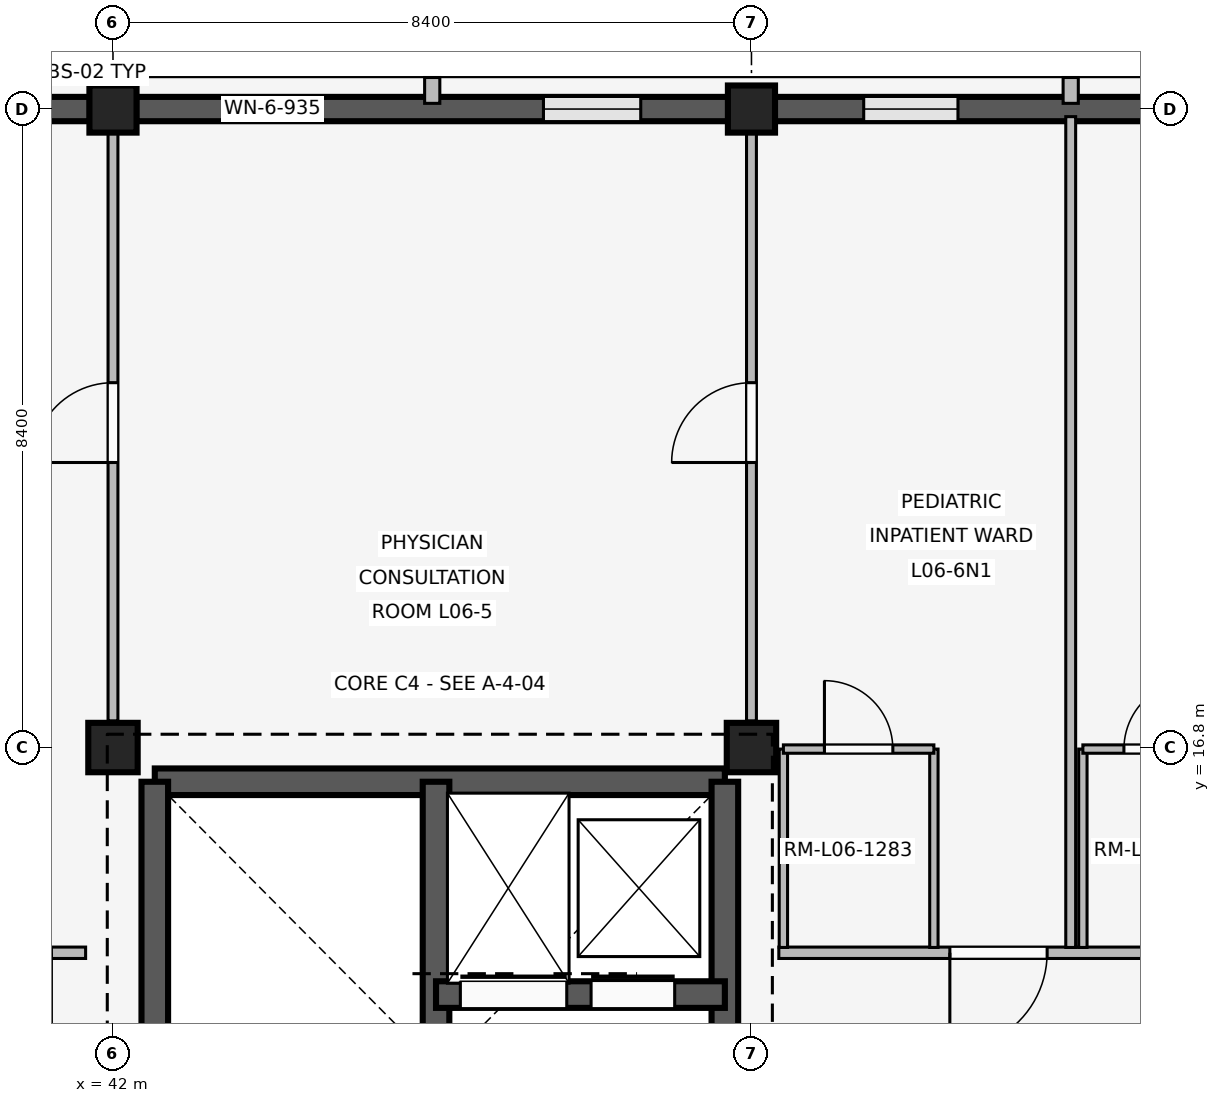
"""IFC4 building model, lengths in metres.
Left out: names, types, materials, properties, quantities, classifications, styles, units other than length and angle.
Written with IfcOpenShell. Run it as: python <this file> out.ifc"""

import sys

from ifc_helpers import new_model, si_unit, direction, frame, frame_2d, origin, origin_2d, place, context, subcontext, project, spatial, rectangle, extrude, element, fill, save


model = new_model("IFC4")
c1 = context("Model", 3, precision=1e-05, world=origin(), true_north=direction((0.0, 1.0)))
c2 = subcontext(c1, "Body", "Model", "MODEL_VIEW")
j1 = project(units=[si_unit("LENGTHUNIT", "METRE"), si_unit("PLANEANGLEUNIT", "RADIAN")], contexts=[c1])
p1 = place(None, origin())
s1 = spatial("IfcSite", under=j1, at=p1, CompositionType="ELEMENT")
p2 = place(p1, origin())
s2 = spatial("IfcBuilding", under=s1, at=p2, CompositionType="ELEMENT")
p3 = place(p2, frame((0.0, 0.0, 24.6)))
s3 = spatial("IfcBuildingStorey", under=s2, at=p3, CompositionType="ELEMENT", Elevation=24.6)
p4 = place(p3, frame((42.0, 16.8, 0.0), z_axis=(0.0, 0.0, 1.0), x_axis=(1.0, 0.0, 0.0)))
e1 = element("IfcColumn", 1, at=p4, inside=s3, PredefinedType="COLUMN", context=c2, shape_type="SweptSolid", body=[
    extrude(rectangle(XDim=0.65, YDim=0.65, at=origin_2d()), origin(), (0.0, 0.0, 1.0), 4.2),
])
p5 = place(p3, frame((42.0, 25.2, 0.0), z_axis=(0.0, 0.0, 1.0), x_axis=(1.0, 0.0, 0.0)))
e2 = element("IfcColumn", 2, at=p5, inside=s3, PredefinedType="COLUMN", context=c2, shape_type="SweptSolid", body=[
    extrude(rectangle(XDim=0.62, YDim=0.62, at=origin_2d()), origin(), (0.0, 0.0, 1.0), 4.2),
])
p6 = place(p3, frame((50.4, 16.8, 0.0), z_axis=(0.0, 0.0, 1.0), x_axis=(1.0, 0.0, 0.0)))
e3 = element("IfcColumn", 3, at=p6, inside=s3, PredefinedType="COLUMN", context=c2, shape_type="SweptSolid", body=[
    extrude(rectangle(XDim=0.65, YDim=0.65, at=origin_2d()), origin(), (0.0, 0.0, 1.0), 4.2),
])
p7 = place(p3, frame((50.4, 25.2, 0.0), z_axis=(0.0, 0.0, 1.0), x_axis=(1.0, 0.0, 0.0)))
e4 = element("IfcColumn", 4, at=p7, inside=s3, PredefinedType="COLUMN", context=c2, shape_type="SweptSolid", body=[
    extrude(rectangle(XDim=0.62, YDim=0.62, at=origin_2d()), origin(), (0.0, 0.0, 1.0), 4.2),
])
p8 = place(p3, frame((33.905, 25.2, 0.0), z_axis=(0.0, 0.0, 1.0), x_axis=(1.0, 0.0, 0.0)))
e5 = element("IfcWall", 5, at=p8, inside=s3, PredefinedType="SOLIDWALL", context=c2, shape_type="SweptSolid", body=[
    extrude(rectangle(XDim=7.79, YDim=0.32, at=frame_2d((3.895, 0.0))), origin(), (0.0, 0.0, 1.0), 3.34),
])
p9 = place(p8, frame((1.112, 0.0, 0.85)))
e6 = element("IfcOpeningElement", 6, at=p9, cuts=e5, PredefinedType="OPENING", context=c2, shape_type="SweptSolid", body=[
    extrude(rectangle(XDim=1.36, YDim=1.42, at=frame_2d((0.68, 0.71))), frame((0.0, 0.17, 0.0), z_axis=(0.0, -1.0, 0.0), x_axis=(1.0, 0.0, 0.0)), (0.0, 0.0, 1.0), 0.34),
])
p10 = place(p8, frame((5.318, 0.0, 0.85)))
e7 = element("IfcOpeningElement", 7, at=p10, cuts=e5, PredefinedType="OPENING", context=c2, shape_type="SweptSolid", body=[
    extrude(rectangle(XDim=1.36, YDim=1.42, at=frame_2d((0.68, 0.71))), frame((0.0, 0.17, 0.0), z_axis=(0.0, -1.0, 0.0), x_axis=(1.0, 0.0, 0.0)), (0.0, 0.0, 1.0), 0.34),
])
p11 = place(p3, frame((42.305, 25.2, 0.0), z_axis=(0.0, 0.0, 1.0), x_axis=(1.0, 0.0, 0.0)))
e8 = element("IfcWall", 8, at=p11, inside=s3, PredefinedType="SOLIDWALL", context=c2, shape_type="SweptSolid", body=[
    extrude(rectangle(XDim=7.79, YDim=0.32, at=frame_2d((3.895, 0.0))), origin(), (0.0, 0.0, 1.0), 3.34),
])
p12 = place(p11, frame((1.152, 0.0, 0.85)))
e9 = element("IfcOpeningElement", 9, at=p12, cuts=e8, PredefinedType="OPENING", context=c2, shape_type="SweptSolid", body=[
    extrude(rectangle(XDim=1.28, YDim=1.38, at=frame_2d((0.64, 0.69))), frame((0.0, 0.17, 0.0), z_axis=(0.0, -1.0, 0.0), x_axis=(1.0, 0.0, 0.0)), (0.0, 0.0, 1.0), 0.34),
])
p13 = place(p11, frame((5.358, 0.0, 0.85)))
e10 = element("IfcOpeningElement", 10, at=p13, cuts=e8, PredefinedType="OPENING", context=c2, shape_type="SweptSolid", body=[
    extrude(rectangle(XDim=1.28, YDim=1.38, at=frame_2d((0.64, 0.69))), frame((0.0, 0.17, 0.0), z_axis=(0.0, -1.0, 0.0), x_axis=(1.0, 0.0, 0.0)), (0.0, 0.0, 1.0), 0.34),
])
p14 = place(p3, frame((46.2, 25.275, 0.0), z_axis=(0.0, 0.0, 1.0), x_axis=(0.0, 1.0, 0.0)))
e11 = element("IfcWall", 11, at=p14, inside=s3, PredefinedType="ELEMENTEDWALL", context=c2, shape_type="SweptSolid", body=[
    extrude(rectangle(XDim=0.34, YDim=0.2, at=frame_2d((0.17, 0.0))), origin(), (0.0, 0.0, 1.0), 3.32),
])
p15 = place(p3, frame((50.705, 25.2, 0.0), z_axis=(0.0, 0.0, 1.0), x_axis=(1.0, 0.0, 0.0)))
e12 = element("IfcWall", 12, at=p15, inside=s3, PredefinedType="SOLIDWALL", context=c2, shape_type="SweptSolid", body=[
    extrude(rectangle(XDim=7.79, YDim=0.32, at=frame_2d((3.895, 0.0))), origin(), (0.0, 0.0, 1.0), 3.34),
])
p16 = place(p15, frame((1.172, 0.0, 0.85)))
e13 = element("IfcOpeningElement", 13, at=p16, cuts=e12, PredefinedType="OPENING", context=c2, shape_type="SweptSolid", body=[
    extrude(rectangle(XDim=1.24, YDim=1.34, at=frame_2d((0.62, 0.67))), frame((0.0, 0.17, 0.0), z_axis=(0.0, -1.0, 0.0), x_axis=(1.0, 0.0, 0.0)), (0.0, 0.0, 1.0), 0.34),
])
p17 = place(p15, frame((5.378, 0.0, 0.85)))
e14 = element("IfcOpeningElement", 14, at=p17, cuts=e12, PredefinedType="OPENING", context=c2, shape_type="SweptSolid", body=[
    extrude(rectangle(XDim=1.24, YDim=1.34, at=frame_2d((0.62, 0.67))), frame((0.0, 0.17, 0.0), z_axis=(0.0, -1.0, 0.0), x_axis=(1.0, 0.0, 0.0)), (0.0, 0.0, 1.0), 0.34),
])
p18 = place(p3, frame((54.6, 25.275, 0.0), z_axis=(0.0, 0.0, 1.0), x_axis=(0.0, 1.0, 0.0)))
e15 = element("IfcWall", 15, at=p18, inside=s3, PredefinedType="ELEMENTEDWALL", context=c2, shape_type="SweptSolid", body=[
    extrude(rectangle(XDim=0.34, YDim=0.2, at=frame_2d((0.17, 0.0))), origin(), (0.0, 0.0, 1.0), 3.32),
])
p19 = place(p3, frame((42.55, 16.35, 0.0), z_axis=(0.0, 0.0, 1.0), x_axis=(1.0, 0.0, 0.0)))
e16 = element("IfcWall", 16, at=p19, inside=s3, PredefinedType="SHEAR", context=c2, shape_type="SweptSolid", body=[
    extrude(rectangle(XDim=7.5, YDim=0.35, at=frame_2d((3.75, 0.0))), origin(), (0.0, 0.0, 1.0), 3.92),
])
p20 = place(p3, frame((42.55, 8.8, 0.0), z_axis=(0.0, 0.0, 1.0), x_axis=(0.0, 1.0, 0.0)))
e17 = element("IfcWall", 17, at=p20, inside=s3, PredefinedType="SHEAR", context=c2, shape_type="SweptSolid", body=[
    extrude(rectangle(XDim=7.55, YDim=0.35, at=frame_2d((3.775, 0.0))), origin(), (0.0, 0.0, 1.0), 3.92),
])
p21 = place(p20, frame((0.28, 0.0, 0.0)))
e18 = element("IfcOpeningElement", 18, at=p21, cuts=e17, PredefinedType="OPENING", context=c2, shape_type="SweptSolid", body=[
    extrude(rectangle(XDim=1.0, YDim=2.15, at=frame_2d((0.5, 1.075))), frame((0.0, 0.185, 0.0), z_axis=(0.0, -1.0, 0.0), x_axis=(1.0, 0.0, 0.0)), (0.0, 0.0, 1.0), 0.37),
])
p22 = place(p3, frame((50.05, 8.8, 0.0), z_axis=(0.0, 0.0, 1.0), x_axis=(0.0, 1.0, 0.0)))
e19 = element("IfcWall", 19, at=p22, inside=s3, PredefinedType="SHEAR", context=c2, shape_type="SweptSolid", body=[
    extrude(rectangle(XDim=7.55, YDim=0.35, at=frame_2d((3.775, 0.0))), origin(), (0.0, 0.0, 1.0), 3.92),
])
p23 = place(p22, frame((2.4, 0.0, 0.0)))
e20 = element("IfcOpeningElement", 20, at=p23, cuts=e19, PredefinedType="OPENING", context=c2, shape_type="SweptSolid", body=[
    extrude(rectangle(XDim=1.2, YDim=2.2, at=frame_2d((0.6, 1.1))), frame((0.0, 0.185, 0.0), z_axis=(0.0, -1.0, 0.0), x_axis=(1.0, 0.0, 0.0)), (0.0, 0.0, 1.0), 0.37),
])
p24 = place(p3, frame((46.25, 8.8, 0.0), z_axis=(0.0, 0.0, 1.0), x_axis=(0.0, 1.0, 0.0)))
e21 = element("IfcWall", 21, at=p24, inside=s3, PredefinedType="SHEAR", context=c2, shape_type="SweptSolid", body=[
    extrude(rectangle(XDim=7.55, YDim=0.35, at=frame_2d((3.775, 0.0))), origin(), (0.0, 0.0, 1.0), 3.92),
])
p25 = place(p24, frame((0.28, 0.0, 0.0)))
e22 = element("IfcOpeningElement", 22, at=p25, cuts=e21, PredefinedType="OPENING", context=c2, shape_type="SweptSolid", body=[
    extrude(rectangle(XDim=1.0, YDim=2.15, at=frame_2d((0.5, 1.075))), frame((0.0, 0.185, 0.0), z_axis=(0.0, -1.0, 0.0), x_axis=(1.0, 0.0, 0.0)), (0.0, 0.0, 1.0), 0.37),
])
p26 = place(p3, frame((46.25, 13.55, 0.0), z_axis=(0.0, 0.0, 1.0), x_axis=(1.0, 0.0, 0.0)))
e23 = element("IfcWall", 23, at=p26, inside=s3, PredefinedType="SHEAR", context=c2, shape_type="SweptSolid", body=[
    extrude(rectangle(XDim=3.8, YDim=0.35, at=frame_2d((1.9, 0.0))), origin(), (0.0, 0.0, 1.0), 3.92),
])
p27 = place(p26, frame((0.32, 0.0, 0.0)))
e24 = element("IfcOpeningElement", 24, at=p27, cuts=e23, PredefinedType="OPENING", context=c2, shape_type="SweptSolid", body=[
    extrude(rectangle(XDim=1.4, YDim=2.25, at=frame_2d((0.7, 1.125))), frame((0.0, 0.185, 0.0), z_axis=(0.0, -1.0, 0.0), x_axis=(1.0, 0.0, 0.0)), (0.0, 0.0, 1.0), 0.37),
])
p28 = place(p26, frame((2.04, 0.0, 0.0)))
e25 = element("IfcOpeningElement", 25, at=p28, cuts=e23, PredefinedType="OPENING", context=c2, shape_type="SweptSolid", body=[
    extrude(rectangle(XDim=1.1, YDim=2.15, at=frame_2d((0.55, 1.075))), frame((0.0, 0.185, 0.0), z_axis=(0.0, -1.0, 0.0), x_axis=(1.0, 0.0, 0.0)), (0.0, 0.0, 1.0), 0.37),
])
p29 = place(p3, frame((41.64, 14.1, 0.0), z_axis=(0.0, 0.0, 1.0), x_axis=(-1.0, 0.0, 0.0)))
e26 = element("IfcWall", 26, at=p29, inside=s3, PredefinedType="PARTITIONING", context=c2, shape_type="SweptSolid", body=[
    extrude(rectangle(XDim=7.9, YDim=0.15, at=frame_2d((3.95, 0.0))), origin(), (0.0, 0.0, 1.0), 3.32),
])
p30 = place(p29, frame((0.45, 0.0, 0.0)))
e27 = element("IfcOpeningElement", 27, at=p30, cuts=e26, PredefinedType="OPENING", context=c2, shape_type="SweptSolid", body=[
    extrude(rectangle(XDim=1.28, YDim=2.2, at=frame_2d((0.64, 1.1))), frame((0.0, 0.085, 0.0), z_axis=(0.0, -1.0, 0.0), x_axis=(1.0, 0.0, 0.0)), (0.0, 0.0, 1.0), 0.17),
])
p31 = place(p29, frame((4.15, 0.0, 0.0)))
e28 = element("IfcOpeningElement", 28, at=p31, cuts=e26, PredefinedType="OPENING", context=c2, shape_type="SweptSolid", body=[
    extrude(rectangle(XDim=1.28, YDim=2.2, at=frame_2d((0.64, 1.1))), frame((0.0, 0.085, 0.0), z_axis=(0.0, -1.0, 0.0), x_axis=(1.0, 0.0, 0.0)), (0.0, 0.0, 1.0), 0.17),
])
p32 = place(p3, frame((42.0, 17.15, 0.0), z_axis=(0.0, 0.0, 1.0), x_axis=(0.0, 1.0, 0.0)))
e29 = element("IfcWall", 29, at=p32, inside=s3, PredefinedType="PARTITIONING", context=c2, shape_type="SweptSolid", body=[
    extrude(rectangle(XDim=7.91, YDim=0.13, at=frame_2d((3.955, 0.0))), origin(), (0.0, 0.0, 1.0), 3.32),
])
p33 = place(p32, frame((3.4, 0.0, 0.0)))
e30 = element("IfcOpeningElement", 30, at=p33, cuts=e29, PredefinedType="OPENING", context=c2, shape_type="SweptSolid", body=[
    extrude(rectangle(XDim=1.05, YDim=2.2, at=frame_2d((0.525, 1.1))), frame((0.0, 0.075, 0.0), z_axis=(0.0, -1.0, 0.0), x_axis=(1.0, 0.0, 0.0)), (0.0, 0.0, 1.0), 0.15),
])
p34 = place(p3, frame((50.4, 17.15, 0.0), z_axis=(0.0, 0.0, 1.0), x_axis=(0.0, 1.0, 0.0)))
e31 = element("IfcWall", 31, at=p34, inside=s3, PredefinedType="PARTITIONING", context=c2, shape_type="SweptSolid", body=[
    extrude(rectangle(XDim=7.91, YDim=0.13, at=frame_2d((3.955, 0.0))), origin(), (0.0, 0.0, 1.0), 3.32),
])
p35 = place(p34, frame((3.4, 0.0, 0.0)))
e32 = element("IfcOpeningElement", 32, at=p35, cuts=e31, PredefinedType="OPENING", context=c2, shape_type="SweptSolid", body=[
    extrude(rectangle(XDim=1.05, YDim=2.2, at=frame_2d((0.525, 1.1))), frame((0.0, 0.075, 0.0), z_axis=(0.0, -1.0, 0.0), x_axis=(1.0, 0.0, 0.0)), (0.0, 0.0, 1.0), 0.15),
])
p36 = place(p3, frame((58.72, 14.1, 0.0), z_axis=(0.0, 0.0, 1.0), x_axis=(-1.0, 0.0, 0.0)))
e33 = element("IfcWall", 33, at=p36, inside=s3, PredefinedType="PARTITIONING", context=c2, shape_type="SweptSolid", body=[
    extrude(rectangle(XDim=7.96, YDim=0.15, at=frame_2d((3.98, 0.0))), origin(), (0.0, 0.0, 1.0), 3.32),
])
p37 = place(p36, frame((0.73, 0.0, 0.0)))
e34 = element("IfcOpeningElement", 34, at=p37, cuts=e33, PredefinedType="OPENING", context=c2, shape_type="SweptSolid", body=[
    extrude(rectangle(XDim=1.28, YDim=2.2, at=frame_2d((0.64, 1.1))), frame((0.0, 0.085, 0.0), z_axis=(0.0, -1.0, 0.0), x_axis=(1.0, 0.0, 0.0)), (0.0, 0.0, 1.0), 0.17),
])
p38 = place(p36, frame((4.43, 0.0, 0.0)))
e35 = element("IfcOpeningElement", 35, at=p38, cuts=e33, PredefinedType="OPENING", context=c2, shape_type="SweptSolid", body=[
    extrude(rectangle(XDim=1.28, YDim=2.2, at=frame_2d((0.64, 1.1))), frame((0.0, 0.085, 0.0), z_axis=(0.0, -1.0, 0.0), x_axis=(1.0, 0.0, 0.0)), (0.0, 0.0, 1.0), 0.17),
])
p39 = place(p3, frame((54.6, 14.17, 0.0), z_axis=(0.0, 0.0, 1.0), x_axis=(0.0, 1.0, 0.0)))
e36 = element("IfcWall", 36, at=p39, inside=s3, PredefinedType="PARTITIONING", context=c2, shape_type="SweptSolid", body=[
    extrude(rectangle(XDim=10.93, YDim=0.13, at=frame_2d((5.465, 0.0))), origin(), (0.0, 0.0, 1.0), 3.32),
])
for number, where, z_axis, x_axis in (
    (37, (50.82, 14.17, 0.0), (0.0, 0.0, 1.0), (0.0, 1.0, 0.0)),
    (38, (52.8, 14.17, 0.0), (0.0, 0.0, 1.0), (0.0, 1.0, 0.0)),
):
    element("IfcWall", number, at=place(p3, frame(where, z_axis=z_axis, x_axis=x_axis)), inside=s3, PredefinedType="PARTITIONING", context=c2, shape_type="SweptSolid", body=[
        extrude(rectangle(XDim=2.61, YDim=0.11, at=frame_2d((1.305, 0.0))), origin(), (0.0, 0.0, 1.0), 3.32),
    ])
p40 = place(p3, frame((50.82, 16.78, 0.0), z_axis=(0.0, 0.0, 1.0), x_axis=(1.0, 0.0, 0.0)))
e39 = element("IfcWall", 39, at=p40, inside=s3, PredefinedType="PARTITIONING", context=c2, shape_type="SweptSolid", body=[
    extrude(rectangle(XDim=1.98, YDim=0.11, at=frame_2d((0.99, 0.0))), origin(), (0.0, 0.0, 1.0), 3.32),
])
p41 = place(p40, frame((0.54, 0.0, 0.0)))
e40 = element("IfcOpeningElement", 40, at=p41, cuts=e39, PredefinedType="OPENING", context=c2, shape_type="SweptSolid", body=[
    extrude(rectangle(XDim=0.9, YDim=2.1, at=frame_2d((0.45, 1.05))), frame((0.0, 0.065, 0.0), z_axis=(0.0, -1.0, 0.0), x_axis=(1.0, 0.0, 0.0)), (0.0, 0.0, 1.0), 0.13),
])
p42 = place(p3, frame((54.76, 14.17, 0.0), z_axis=(0.0, 0.0, 1.0), x_axis=(0.0, 1.0, 0.0)))
e41 = element("IfcWall", 41, at=p42, inside=s3, PredefinedType="PARTITIONING", context=c2, shape_type="SweptSolid", body=[
    extrude(rectangle(XDim=2.61, YDim=0.11, at=frame_2d((1.305, 0.0))), origin(), (0.0, 0.0, 1.0), 3.32),
])
p43 = place(p3, frame((54.76, 16.78, 0.0), z_axis=(0.0, 0.0, 1.0), x_axis=(1.0, 0.0, 0.0)))
e42 = element("IfcWall", 42, at=p43, inside=s3, PredefinedType="PARTITIONING", context=c2, shape_type="SweptSolid", body=[
    extrude(rectangle(XDim=1.98, YDim=0.11, at=frame_2d((0.99, 0.0))), origin(), (0.0, 0.0, 1.0), 3.32),
])
p44 = place(p43, frame((0.54, 0.0, 0.0)))
e43 = element("IfcOpeningElement", 43, at=p44, cuts=e42, PredefinedType="OPENING", context=c2, shape_type="SweptSolid", body=[
    extrude(rectangle(XDim=0.9, YDim=2.1, at=frame_2d((0.45, 1.05))), frame((0.0, 0.065, 0.0), z_axis=(0.0, -1.0, 0.0), x_axis=(1.0, 0.0, 0.0)), (0.0, 0.0, 1.0), 0.13),
])
p45 = place(p12, origin())
e44 = element("IfcWindow", 44, at=p45, inside=s3, PartitioningType="SINGLE_PANEL", PredefinedType="WINDOW", context=c2, shape_type="SweptSolid", body=[
    extrude(rectangle(XDim=1.28, YDim=1.38, at=frame_2d((0.64, 0.69))), frame((0.0, 0.03, 0.0), z_axis=(0.0, -1.0, 0.0), x_axis=(1.0, 0.0, 0.0)), (0.0, 0.0, 1.0), 0.06),
])
fill(e9, e44)
p46 = place(p13, origin())
e45 = element("IfcWindow", 45, at=p46, inside=s3, PartitioningType="SINGLE_PANEL", PredefinedType="WINDOW", context=c2, shape_type="SweptSolid", body=[
    extrude(rectangle(XDim=1.28, YDim=1.38, at=frame_2d((0.64, 0.69))), frame((0.0, 0.03, 0.0), z_axis=(0.0, -1.0, 0.0), x_axis=(1.0, 0.0, 0.0)), (0.0, 0.0, 1.0), 0.06),
])
fill(e10, e45)
p47 = place(p16, origin())
e46 = element("IfcWindow", 46, at=p47, inside=s3, PartitioningType="SINGLE_PANEL", PredefinedType="WINDOW", context=c2, shape_type="SweptSolid", body=[
    extrude(rectangle(XDim=1.24, YDim=1.34, at=frame_2d((0.62, 0.67))), frame((0.0, 0.03, 0.0), z_axis=(0.0, -1.0, 0.0), x_axis=(1.0, 0.0, 0.0)), (0.0, 0.0, 1.0), 0.06),
])
fill(e13, e46)
p48 = place(p27, origin())
e47 = element("IfcDoor", 47, at=p48, inside=s3, OperationType="SLIDING_TO_LEFT", PredefinedType="DOOR", context=c2, shape_type="SweptSolid", body=[
    extrude(rectangle(XDim=1.4, YDim=2.25, at=frame_2d((0.7, 1.125))), frame((0.0, 0.025, 0.0), z_axis=(0.0, -1.0, 0.0), x_axis=(1.0, 0.0, 0.0)), (0.0, 0.0, 1.0), 0.05),
])
fill(e24, e47)
p49 = place(p28, origin())
e48 = element("IfcDoor", 48, at=p49, inside=s3, OperationType="SLIDING_TO_LEFT", PredefinedType="DOOR", context=c2, shape_type="SweptSolid", body=[
    extrude(rectangle(XDim=1.1, YDim=2.15, at=frame_2d((0.55, 1.075))), frame((0.0, 0.025, 0.0), z_axis=(0.0, -1.0, 0.0), x_axis=(1.0, 0.0, 0.0)), (0.0, 0.0, 1.0), 0.05),
])
fill(e25, e48)
p50 = place(p33, origin())
e49 = element("IfcDoor", 49, at=p50, inside=s3, OperationType="SINGLE_SWING_LEFT", PredefinedType="DOOR", context=c2, shape_type="SweptSolid", body=[
    extrude(rectangle(XDim=1.05, YDim=2.2, at=frame_2d((0.525, 1.1))), frame((0.0, 0.025, 0.0), z_axis=(0.0, -1.0, 0.0), x_axis=(1.0, 0.0, 0.0)), (0.0, 0.0, 1.0), 0.05),
])
fill(e30, e49)
p51 = place(p35, origin())
e50 = element("IfcDoor", 50, at=p51, inside=s3, OperationType="SINGLE_SWING_LEFT", PredefinedType="DOOR", context=c2, shape_type="SweptSolid", body=[
    extrude(rectangle(XDim=1.05, YDim=2.2, at=frame_2d((0.525, 1.1))), frame((0.0, 0.025, 0.0), z_axis=(0.0, -1.0, 0.0), x_axis=(1.0, 0.0, 0.0)), (0.0, 0.0, 1.0), 0.05),
])
fill(e32, e50)
p52 = place(p38, origin())
e51 = element("IfcDoor", 51, at=p52, inside=s3, OperationType="SINGLE_SWING_RIGHT", PredefinedType="DOOR", context=c2, shape_type="SweptSolid", body=[
    extrude(rectangle(XDim=1.28, YDim=2.2, at=frame_2d((0.64, 1.1))), frame((0.0, 0.025, 0.0), z_axis=(0.0, -1.0, 0.0), x_axis=(1.0, 0.0, 0.0)), (0.0, 0.0, 1.0), 0.05),
])
fill(e35, e51)
p53 = place(p41, origin())
e52 = element("IfcDoor", 52, at=p53, inside=s3, OperationType="SINGLE_SWING_LEFT", PredefinedType="DOOR", context=c2, shape_type="SweptSolid", body=[
    extrude(rectangle(XDim=0.9, YDim=2.1, at=frame_2d((0.45, 1.05))), frame((0.0, 0.025, 0.0), z_axis=(0.0, -1.0, 0.0), x_axis=(1.0, 0.0, 0.0)), (0.0, 0.0, 1.0), 0.05),
])
fill(e40, e52)
p54 = place(p44, origin())
e53 = element("IfcDoor", 53, at=p54, inside=s3, OperationType="SINGLE_SWING_RIGHT", PredefinedType="DOOR", context=c2, shape_type="SweptSolid", body=[
    extrude(rectangle(XDim=0.9, YDim=2.1, at=frame_2d((0.45, 1.05))), frame((0.0, 0.025, 0.0), z_axis=(0.0, -1.0, 0.0), x_axis=(1.0, 0.0, 0.0)), (0.0, 0.0, 1.0), 0.05),
])
fill(e43, e53)
save(model, sys.argv[1])
